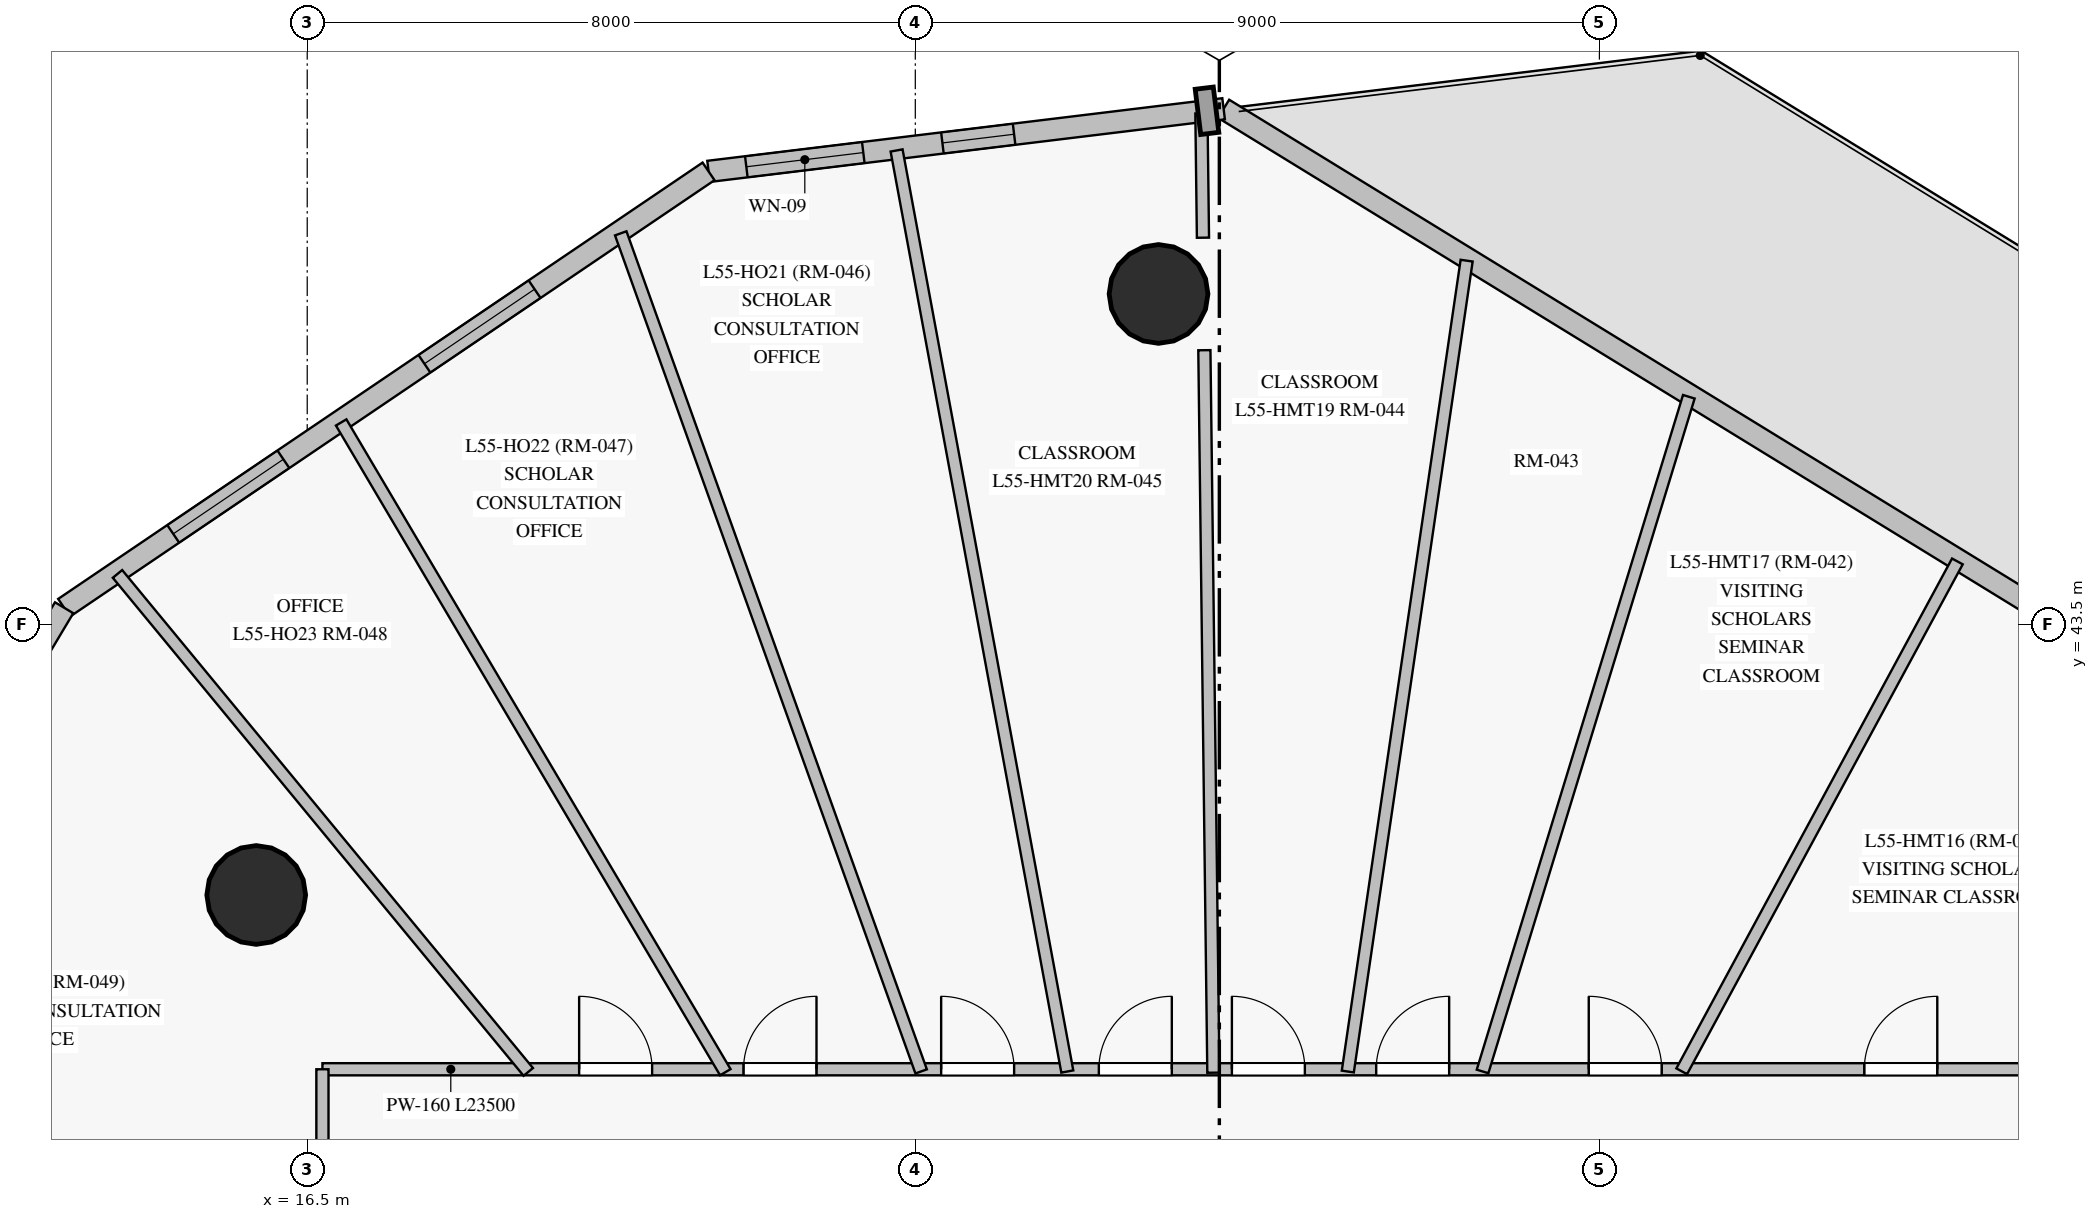
"""IFC4 building model, lengths in metres.
Left out: names, types, materials, properties, quantities, classifications, styles, units other than length and angle.
Written with IfcOpenShell. Run it as: python <this file> out.ifc"""

import sys

from ifc_helpers import new_model, si_unit, direction, frame, frame_2d, origin, origin_with_axes, origin_2d, place, context, subcontext, project, spatial, rectangle, circle, extrude, source, transform, mapped, element, fill, save


model = new_model("IFC4")
c1 = context("Model", 3, precision=1e-05, world=origin(), true_north=direction((0.0, 1.0)))
c2 = subcontext(c1, "Body", "Model", "MODEL_VIEW")
j1 = project(units=[si_unit("LENGTHUNIT", "METRE"), si_unit("PLANEANGLEUNIT", "RADIAN")], contexts=[c1])
p1 = place(None, origin())
s1 = spatial("IfcSite", under=j1, at=p1, CompositionType="ELEMENT")
p2 = place(p1, origin())
s2 = spatial("IfcBuilding", under=s1, at=p2, CompositionType="ELEMENT")
p3 = place(p2, frame((0.0, 0.0, 190.1)))
s3 = spatial("IfcBuildingStorey", under=s2, at=p3, CompositionType="ELEMENT", Elevation=190.1)
m1 = source(origin_with_axes(), c2, "Body", "SweptSolid", [
    extrude(circle(Radius=0.65, at=origin_2d()), origin(), (0.0, 0.0, 1.0), 3.05),
])
for number, where, z_axis, x_axis in (
    (1, (27.7, 47.85, 0.0), (0.0, 0.0, 1.0), (1.0, 0.0, 0.0)),
    (2, (15.829, 39.943, 0.0), (0.0, 0.0, 1.0), (1.0, 0.0, 0.0)),
):
    element("IfcColumn", number, at=place(p3, frame(where, z_axis=z_axis, x_axis=x_axis)), inside=s3, PredefinedType="COLUMN", context=c2, shape_type="MappedRepresentation", body=[
        mapped(m1, transform((0.0, 0.0, 0.0), scale=1.0)),
    ])
p4 = place(p3, frame((44.958, 40.218, 0.0), z_axis=(0.0, 0.0, 1.0), x_axis=(-0.852257947878, 0.523121773853, 0.0)))
e3 = element("IfcWall", 3, at=p4, inside=s3, PredefinedType="SOLIDWALL", context=c2, shape_type="SweptSolid", body=[
    extrude(rectangle(XDim=19.246, YDim=0.28, at=frame_2d((9.623, 0.0))), origin(), (0.0, 0.0, 1.0), 2.495),
])
p5 = place(p4, frame((4.287, 0.0, 0.0)))
e4 = element("IfcOpeningElement", 4, at=p5, cuts=e3, PredefinedType="OPENING", context=c2, shape_type="SweptSolid", body=[
    extrude(rectangle(XDim=1.05, YDim=2.12, at=frame_2d((0.525, 1.06))), frame((0.0, 0.15, 0.0), z_axis=(0.0, -1.0, 0.0), x_axis=(1.0, 0.0, 0.0)), (0.0, 0.0, 1.0), 0.3),
])
p6 = place(p3, frame((28.556, 50.286, 0.0), z_axis=(0.0, 0.0, 1.0), x_axis=(-0.992692032934, -0.120675298833, 0.0)))
e5 = element("IfcWall", 5, at=p6, inside=s3, PredefinedType="SOLIDWALL", context=c2, shape_type="SweptSolid", body=[
    extrude(rectangle(XDim=6.826, YDim=0.28, at=frame_2d((3.413, 0.0))), origin(), (0.0, 0.0, 1.0), 2.825),
])
p7 = place(p6, frame((2.777, 0.0, 0.85)))
e6 = element("IfcOpeningElement", 6, at=p7, cuts=e5, PredefinedType="OPENING", context=c2, shape_type="SweptSolid", body=[
    extrude(rectangle(XDim=0.95, YDim=1.5, at=frame_2d((0.475, 0.75))), frame((0.0, 0.15, 0.0), z_axis=(0.0, -1.0, 0.0), x_axis=(1.0, 0.0, 0.0)), (0.0, 0.0, 1.0), 0.3),
])
p8 = place(p6, frame((4.775, 0.0, 0.85)))
e7 = element("IfcOpeningElement", 7, at=p8, cuts=e5, PredefinedType="OPENING", context=c2, shape_type="SweptSolid", body=[
    extrude(rectangle(XDim=1.55, YDim=1.65, at=frame_2d((0.775, 0.825))), frame((0.0, 0.15, 0.0), z_axis=(0.0, -1.0, 0.0), x_axis=(1.0, 0.0, 0.0)), (0.0, 0.0, 1.0), 0.3),
])
p9 = place(p3, frame((21.78, 49.462, 0.0), z_axis=(0.0, 0.0, 1.0), x_axis=(-0.82803760376, -0.560672566441, 0.0)))
e8 = element("IfcWall", 8, at=p9, inside=s3, PredefinedType="SOLIDWALL", context=c2, shape_type="SweptSolid", body=[
    extrude(rectangle(XDim=10.239, YDim=0.28, at=frame_2d((5.12, 0.0))), origin(), (0.0, 0.0, 1.0), 2.825),
])
p10 = place(p9, frame((2.764, 0.0, 0.85)))
e9 = element("IfcOpeningElement", 9, at=p10, cuts=e8, PredefinedType="OPENING", context=c2, shape_type="SweptSolid", body=[
    extrude(rectangle(XDim=1.75, YDim=1.65, at=frame_2d((0.875, 0.825))), frame((0.0, 0.15, 0.0), z_axis=(0.0, -1.0, 0.0), x_axis=(1.0, 0.0, 0.0)), (0.0, 0.0, 1.0), 0.3),
])
p11 = place(p9, frame((6.756, 0.0, 0.85)))
e10 = element("IfcOpeningElement", 10, at=p11, cuts=e8, PredefinedType="OPENING", context=c2, shape_type="SweptSolid", body=[
    extrude(rectangle(XDim=1.75, YDim=1.65, at=frame_2d((0.875, 0.825))), frame((0.0, 0.15, 0.0), z_axis=(0.0, -1.0, 0.0), x_axis=(1.0, 0.0, 0.0)), (0.0, 0.0, 1.0), 0.3),
])
p12 = place(p3, frame((13.302, 43.722, 0.0), z_axis=(0.0, 0.0, 1.0), x_axis=(-0.512903816994, -0.858446081308, 0.0)))
e11 = element("IfcWall", 11, at=p12, inside=s3, PredefinedType="SOLIDWALL", context=c2, shape_type="SweptSolid", body=[
    extrude(rectangle(XDim=14.194, YDim=0.28, at=frame_2d((7.097, 0.0))), origin(), (0.0, 0.0, 1.0), 2.825),
])
p13 = place(p12, frame((1.334, 0.0, 0.85)))
e12 = element("IfcOpeningElement", 12, at=p13, cuts=e11, PredefinedType="OPENING", context=c2, shape_type="SweptSolid", body=[
    extrude(rectangle(XDim=1.75, YDim=1.65, at=frame_2d((0.875, 0.825))), frame((0.0, 0.15, 0.0), z_axis=(0.0, -1.0, 0.0), x_axis=(1.0, 0.0, 0.0)), (0.0, 0.0, 1.0), 0.3),
])
p14 = place(p12, frame((4.993, 0.0, 0.85)))
e13 = element("IfcOpeningElement", 13, at=p14, cuts=e11, PredefinedType="OPENING", context=c2, shape_type="SweptSolid", body=[
    extrude(rectangle(XDim=1.75, YDim=1.65, at=frame_2d((0.875, 0.825))), frame((0.0, 0.15, 0.0), z_axis=(0.0, -1.0, 0.0), x_axis=(1.0, 0.0, 0.0)), (0.0, 0.0, 1.0), 0.3),
])
p15 = place(p12, frame((9.608, 0.0, 0.85)))
e14 = element("IfcOpeningElement", 14, at=p15, cuts=e11, PredefinedType="OPENING", context=c2, shape_type="SweptSolid", body=[
    extrude(rectangle(XDim=1.75, YDim=1.65, at=frame_2d((0.875, 0.825))), frame((0.0, 0.15, 0.0), z_axis=(0.0, -1.0, 0.0), x_axis=(1.0, 0.0, 0.0)), (0.0, 0.0, 1.0), 0.3),
])
p16 = place(p3, frame((16.7, 37.65, 0.0), z_axis=(0.0, 0.0, 1.0), x_axis=(1.0, 0.0, 0.0)))
e15 = element("IfcWall", 15, at=p16, inside=s3, PredefinedType="PARTITIONING", context=c2, shape_type="SweptSolid", body=[
    extrude(rectangle(XDim=23.5, YDim=0.16, at=frame_2d((11.75, 0.0))), origin(), (0.0, 0.0, 1.0), 2.375),
])
p17 = place(p16, frame((20.285, 0.0, 0.0)))
e16 = element("IfcOpeningElement", 16, at=p17, cuts=e15, PredefinedType="OPENING", context=c2, shape_type="SweptSolid", body=[
    extrude(rectangle(XDim=0.96, YDim=2.15, at=frame_2d((0.48, 1.075))), frame((0.0, 0.09, 0.0), z_axis=(0.0, -1.0, 0.0), x_axis=(1.0, 0.0, 0.0)), (0.0, 0.0, 1.0), 0.18),
])
p18 = place(p16, frame((16.66, 0.0, 0.0)))
e17 = element("IfcOpeningElement", 17, at=p18, cuts=e15, PredefinedType="OPENING", context=c2, shape_type="SweptSolid", body=[
    extrude(rectangle(XDim=0.96, YDim=2.15, at=frame_2d((0.48, 1.075))), frame((0.0, 0.09, 0.0), z_axis=(0.0, -1.0, 0.0), x_axis=(1.0, 0.0, 0.0)), (0.0, 0.0, 1.0), 0.18),
])
p19 = place(p16, frame((13.863, 0.0, 0.0)))
e18 = element("IfcOpeningElement", 18, at=p19, cuts=e15, PredefinedType="OPENING", context=c2, shape_type="SweptSolid", body=[
    extrude(rectangle(XDim=0.96, YDim=2.15, at=frame_2d((0.48, 1.075))), frame((0.0, 0.09, 0.0), z_axis=(0.0, -1.0, 0.0), x_axis=(1.0, 0.0, 0.0)), (0.0, 0.0, 1.0), 0.18),
])
p20 = place(p16, frame((11.965, 0.0, 0.0)))
e19 = element("IfcOpeningElement", 19, at=p20, cuts=e15, PredefinedType="OPENING", context=c2, shape_type="SweptSolid", body=[
    extrude(rectangle(XDim=0.96, YDim=2.15, at=frame_2d((0.48, 1.075))), frame((0.0, 0.09, 0.0), z_axis=(0.0, -1.0, 0.0), x_axis=(1.0, 0.0, 0.0)), (0.0, 0.0, 1.0), 0.18),
])
p21 = place(p16, frame((10.215, 0.0, 0.0)))
e20 = element("IfcOpeningElement", 20, at=p21, cuts=e15, PredefinedType="OPENING", context=c2, shape_type="SweptSolid", body=[
    extrude(rectangle(XDim=0.96, YDim=2.15, at=frame_2d((0.48, 1.075))), frame((0.0, 0.09, 0.0), z_axis=(0.0, -1.0, 0.0), x_axis=(1.0, 0.0, 0.0)), (0.0, 0.0, 1.0), 0.18),
])
p22 = place(p16, frame((8.14, 0.0, 0.0)))
e21 = element("IfcOpeningElement", 21, at=p22, cuts=e15, PredefinedType="OPENING", context=c2, shape_type="SweptSolid", body=[
    extrude(rectangle(XDim=0.96, YDim=2.15, at=frame_2d((0.48, 1.075))), frame((0.0, 0.09, 0.0), z_axis=(0.0, -1.0, 0.0), x_axis=(1.0, 0.0, 0.0)), (0.0, 0.0, 1.0), 0.18),
])
p23 = place(p16, frame((5.54, 0.0, 0.0)))
e22 = element("IfcOpeningElement", 22, at=p23, cuts=e15, PredefinedType="OPENING", context=c2, shape_type="SweptSolid", body=[
    extrude(rectangle(XDim=0.96, YDim=2.15, at=frame_2d((0.48, 1.075))), frame((0.0, 0.09, 0.0), z_axis=(0.0, -1.0, 0.0), x_axis=(1.0, 0.0, 0.0)), (0.0, 0.0, 1.0), 0.18),
])
p24 = place(p16, frame((3.377, 0.0, 0.0)))
e23 = element("IfcOpeningElement", 23, at=p24, cuts=e15, PredefinedType="OPENING", context=c2, shape_type="SweptSolid", body=[
    extrude(rectangle(XDim=0.96, YDim=2.15, at=frame_2d((0.48, 1.075))), frame((0.0, 0.09, 0.0), z_axis=(0.0, -1.0, 0.0), x_axis=(1.0, 0.0, 0.0)), (0.0, 0.0, 1.0), 0.18),
])
p25 = place(p3, frame((16.7, 15.35, 0.0), z_axis=(0.0, 0.0, 1.0), x_axis=(0.0, 1.0, 0.0)))
e24 = element("IfcWall", 24, at=p25, inside=s3, PredefinedType="PARTITIONING", context=c2, shape_type="SweptSolid", body=[
    extrude(rectangle(XDim=22.3, YDim=0.16, at=frame_2d((11.15, 0.0))), origin(), (0.0, 0.0, 1.0), 2.275),
])
p26 = place(p25, frame((16.25, 0.0, 0.0)))
e25 = element("IfcOpeningElement", 25, at=p26, cuts=e24, PredefinedType="OPENING", context=c2, shape_type="SweptSolid", body=[
    extrude(rectangle(XDim=0.96, YDim=2.15, at=frame_2d((0.48, 1.075))), frame((0.0, 0.09, 0.0), z_axis=(0.0, -1.0, 0.0), x_axis=(1.0, 0.0, 0.0)), (0.0, 0.0, 1.0), 0.18),
])
p27 = place(p25, frame((11.065, 0.0, 0.0)))
e26 = element("IfcOpeningElement", 26, at=p27, cuts=e24, PredefinedType="OPENING", context=c2, shape_type="SweptSolid", body=[
    extrude(rectangle(XDim=0.96, YDim=2.15, at=frame_2d((0.48, 1.075))), frame((0.0, 0.09, 0.0), z_axis=(0.0, -1.0, 0.0), x_axis=(1.0, 0.0, 0.0)), (0.0, 0.0, 1.0), 0.18),
])
p28 = place(p25, frame((7.33, 0.0, 0.0)))
e27 = element("IfcOpeningElement", 27, at=p28, cuts=e24, PredefinedType="OPENING", context=c2, shape_type="SweptSolid", body=[
    extrude(rectangle(XDim=0.96, YDim=2.15, at=frame_2d((0.48, 1.075))), frame((0.0, 0.09, 0.0), z_axis=(0.0, -1.0, 0.0), x_axis=(1.0, 0.0, 0.0)), (0.0, 0.0, 1.0), 0.18),
])
p29 = place(p25, frame((5.1, 0.0, 0.0)))
e28 = element("IfcOpeningElement", 28, at=p29, cuts=e24, PredefinedType="OPENING", context=c2, shape_type="SweptSolid", body=[
    extrude(rectangle(XDim=0.96, YDim=2.15, at=frame_2d((0.48, 1.075))), frame((0.0, 0.09, 0.0), z_axis=(0.0, -1.0, 0.0), x_axis=(1.0, 0.0, 0.0)), (0.0, 0.0, 1.0), 0.18),
])
p30 = place(p25, frame((18.392, 0.0, 0.0)))
e29 = element("IfcOpeningElement", 29, at=p30, cuts=e24, PredefinedType="OPENING", context=c2, shape_type="SweptSolid", body=[
    extrude(rectangle(XDim=0.96, YDim=2.15, at=frame_2d((0.48, 1.075))), frame((0.0, 0.09, 0.0), z_axis=(0.0, -1.0, 0.0), x_axis=(1.0, 0.0, 0.0)), (0.0, 0.0, 1.0), 0.18),
])
p31 = place(p3, frame((26.5, 37.621, 0.0), z_axis=(0.0, 0.0, 1.0), x_axis=(-0.182240362036, 0.983254011151, 0.0)))
e30 = element("IfcWall", 30, at=p31, inside=s3, PredefinedType="PARTITIONING", context=c2, shape_type="SweptSolid", body=[
    extrude(rectangle(XDim=12.323, YDim=0.16, at=frame_2d((6.162, 0.0))), origin(), (0.0, 0.0, 1.0), 2.275),
])
p32 = place(p3, frame((24.577, 37.622, 0.0), z_axis=(0.0, 0.0, 1.0), x_axis=(-0.337446658825, 0.941344651256, 0.0)))
e31 = element("IfcWall", 31, at=p32, inside=s3, PredefinedType="PARTITIONING", context=c2, shape_type="SweptSolid", body=[
    extrude(rectangle(XDim=11.713, YDim=0.16, at=frame_2d((5.856, 0.0))), origin(), (0.0, 0.0, 1.0), 2.825),
])
p33 = place(p3, frame((30.19, 37.62, 0.0), z_axis=(0.0, 0.0, 1.0), x_axis=(0.144990049748, 0.989433113189, 0.0)))
e32 = element("IfcWall", 32, at=p33, inside=s3, PredefinedType="PARTITIONING", context=c2, shape_type="SweptSolid", body=[
    extrude(rectangle(XDim=10.782, YDim=0.16, at=frame_2d((5.391, 0.0))), origin(), (0.0, 0.0, 1.0), 2.825),
])
p34 = place(p3, frame((22.0, 37.611, 0.0), z_axis=(0.0, 0.0, 1.0), x_axis=(-0.508928084583, 0.8608090408, 0.0)))
e33 = element("IfcWall", 33, at=p34, inside=s3, PredefinedType="PARTITIONING", context=c2, shape_type="SweptSolid", body=[
    extrude(rectangle(XDim=9.931, YDim=0.16, at=frame_2d((4.965, 0.0))), origin(), (0.0, 0.0, 1.0), 2.825),
])
p35 = place(p3, frame((28.421, 37.605, 0.0), z_axis=(0.0, 0.0, 1.0), x_axis=(-0.01245633196, 0.999922416887, 0.0)))
e34 = element("IfcWall", 34, at=p35, inside=s3, PredefinedType="PARTITIONING", context=c2, shape_type="SweptSolid", body=[
    extrude(rectangle(XDim=9.506, YDim=0.16, at=frame_2d((4.753, 0.0))), origin(), (0.0, 0.0, 1.0), 2.275),
])
p36 = place(p3, frame((31.963, 37.621, 0.0), z_axis=(0.0, 0.0, 1.0), x_axis=(0.292360870747, 0.956308068175, 0.0)))
e35 = element("IfcWall", 35, at=p36, inside=s3, PredefinedType="PARTITIONING", context=c2, shape_type="SweptSolid", body=[
    extrude(rectangle(XDim=9.282, YDim=0.16, at=frame_2d((4.641, 0.0))), origin(), (0.0, 0.0, 1.0), 2.825),
])
p37 = place(p3, frame((16.727, 32.828, 0.0), z_axis=(0.0, 0.0, 1.0), x_axis=(-0.882944481413, 0.469477414517, 0.0)))
e36 = element("IfcWall", 36, at=p37, inside=s3, PredefinedType="PARTITIONING", context=c2, shape_type="SweptSolid", body=[
    extrude(rectangle(XDim=8.513, YDim=0.16, at=frame_2d((4.256, 0.0))), origin(), (0.0, 0.0, 1.0), 2.825),
])
p38 = place(p3, frame((19.408, 37.615, 0.0), z_axis=(0.0, 0.0, 1.0), x_axis=(-0.636333777541, 0.771413847141, 0.0)))
e37 = element("IfcWall", 37, at=p38, inside=s3, PredefinedType="PARTITIONING", context=c2, shape_type="SweptSolid", body=[
    extrude(rectangle(XDim=8.493, YDim=0.16, at=frame_2d((4.247, 0.0))), origin(), (0.0, 0.0, 1.0), 2.825),
])
p39 = place(p3, frame((34.583, 37.624, 0.0), z_axis=(0.0, 0.0, 1.0), x_axis=(0.47560743502, 0.879657642355, 0.0)))
e38 = element("IfcWall", 38, at=p39, inside=s3, PredefinedType="PARTITIONING", context=c2, shape_type="SweptSolid", body=[
    extrude(rectangle(XDim=7.625, YDim=0.16, at=frame_2d((3.813, 0.0))), origin(), (0.0, 0.0, 1.0), 2.825),
])
p40 = place(p3, frame((28.284, 48.59, 0.0), z_axis=(0.0, 0.0, 1.0), x_axis=(-0.01239265735, 0.999923208073, 0.0)))
e39 = element("IfcWall", 39, at=p40, inside=s3, PredefinedType="PARTITIONING", context=c2, shape_type="SweptSolid", body=[
    extrude(rectangle(XDim=1.635, YDim=0.16, at=frame_2d((0.818, 0.0))), origin(), (0.0, 0.0, 1.0), 2.495),
])
m2 = source(origin_with_axes(), c2, "Body", "SweptSolid", [
    extrude(rectangle(XDim=0.95, YDim=1.5, at=frame_2d((0.475, 0.75))), frame((0.0, 0.03, 0.0), z_axis=(0.0, -1.0, 0.0), x_axis=(1.0, 0.0, 0.0)), (0.0, 0.0, 1.0), 0.06),
])
p41 = place(p7, origin())
e40 = element("IfcWindow", 40, at=p41, inside=s3, PartitioningType="SINGLE_PANEL", PredefinedType="WINDOW", context=c2, shape_type="MappedRepresentation", body=[
    mapped(m2, transform((0.0, 0.0, 0.0), scale=1.0)),
])
fill(e6, e40)
m3 = source(origin_with_axes(), c2, "Body", "SweptSolid", [
    extrude(rectangle(XDim=1.55, YDim=1.65, at=frame_2d((0.775, 0.825))), frame((0.0, 0.03, 0.0), z_axis=(0.0, -1.0, 0.0), x_axis=(1.0, 0.0, 0.0)), (0.0, 0.0, 1.0), 0.06),
])
p42 = place(p8, origin())
e41 = element("IfcWindow", 41, at=p42, inside=s3, PartitioningType="SINGLE_PANEL", PredefinedType="WINDOW", context=c2, shape_type="MappedRepresentation", body=[
    mapped(m3, transform((0.0, 0.0, 0.0), scale=1.0)),
])
fill(e7, e41)
m4 = source(origin_with_axes(), c2, "Body", "SweptSolid", [
    extrude(rectangle(XDim=1.75, YDim=1.65, at=frame_2d((0.875, 0.825))), frame((0.0, 0.03, 0.0), z_axis=(0.0, -1.0, 0.0), x_axis=(1.0, 0.0, 0.0)), (0.0, 0.0, 1.0), 0.06),
])
p43 = place(p10, origin())
e42 = element("IfcWindow", 42, at=p43, inside=s3, PartitioningType="SINGLE_PANEL", PredefinedType="WINDOW", context=c2, shape_type="MappedRepresentation", body=[
    mapped(m4, transform((0.0, 0.0, 0.0), scale=1.0)),
])
fill(e9, e42)
p44 = place(p11, origin())
e43 = element("IfcWindow", 43, at=p44, inside=s3, PartitioningType="SINGLE_PANEL", PredefinedType="WINDOW", context=c2, shape_type="MappedRepresentation", body=[
    mapped(m4, transform((0.0, 0.0, 0.0), scale=1.0)),
])
fill(e10, e43)
m5 = source(origin_with_axes(), c2, "Body", "SweptSolid", [
    extrude(rectangle(XDim=0.96, YDim=2.15, at=frame_2d((0.48, 1.075))), frame((0.0, 0.025, 0.0), z_axis=(0.0, -1.0, 0.0), x_axis=(1.0, 0.0, 0.0)), (0.0, 0.0, 1.0), 0.05),
])
p45 = place(p17, origin())
e44 = element("IfcDoor", 44, at=p45, inside=s3, OperationType="SINGLE_SWING_RIGHT", PredefinedType="DOOR", context=c2, shape_type="MappedRepresentation", body=[
    mapped(m5, transform((0.0, 0.0, 0.0), scale=1.0)),
])
fill(e16, e44)
p46 = place(p18, origin())
e45 = element("IfcDoor", 45, at=p46, inside=s3, OperationType="SINGLE_SWING_LEFT", PredefinedType="DOOR", context=c2, shape_type="MappedRepresentation", body=[
    mapped(m5, transform((0.0, 0.0, 0.0), scale=1.0)),
])
fill(e17, e45)
p47 = place(p19, origin())
e46 = element("IfcDoor", 46, at=p47, inside=s3, OperationType="SINGLE_SWING_RIGHT", PredefinedType="DOOR", context=c2, shape_type="MappedRepresentation", body=[
    mapped(m5, transform((0.0, 0.0, 0.0), scale=1.0)),
])
fill(e18, e46)
p48 = place(p20, origin())
e47 = element("IfcDoor", 47, at=p48, inside=s3, OperationType="SINGLE_SWING_LEFT", PredefinedType="DOOR", context=c2, shape_type="MappedRepresentation", body=[
    mapped(m5, transform((0.0, 0.0, 0.0), scale=1.0)),
])
fill(e19, e47)
p49 = place(p21, origin())
e48 = element("IfcDoor", 48, at=p49, inside=s3, OperationType="SINGLE_SWING_RIGHT", PredefinedType="DOOR", context=c2, shape_type="MappedRepresentation", body=[
    mapped(m5, transform((0.0, 0.0, 0.0), scale=1.0)),
])
fill(e20, e48)
p50 = place(p22, origin())
e49 = element("IfcDoor", 49, at=p50, inside=s3, OperationType="SINGLE_SWING_LEFT", PredefinedType="DOOR", context=c2, shape_type="MappedRepresentation", body=[
    mapped(m5, transform((0.0, 0.0, 0.0), scale=1.0)),
])
fill(e21, e49)
p51 = place(p23, origin())
e50 = element("IfcDoor", 50, at=p51, inside=s3, OperationType="SINGLE_SWING_RIGHT", PredefinedType="DOOR", context=c2, shape_type="MappedRepresentation", body=[
    mapped(m5, transform((0.0, 0.0, 0.0), scale=1.0)),
])
fill(e22, e50)
p52 = place(p24, origin())
e51 = element("IfcDoor", 51, at=p52, inside=s3, OperationType="SINGLE_SWING_LEFT", PredefinedType="DOOR", context=c2, shape_type="MappedRepresentation", body=[
    mapped(m5, transform((0.0, 0.0, 0.0), scale=1.0)),
])
fill(e23, e51)
save(model, sys.argv[1])
